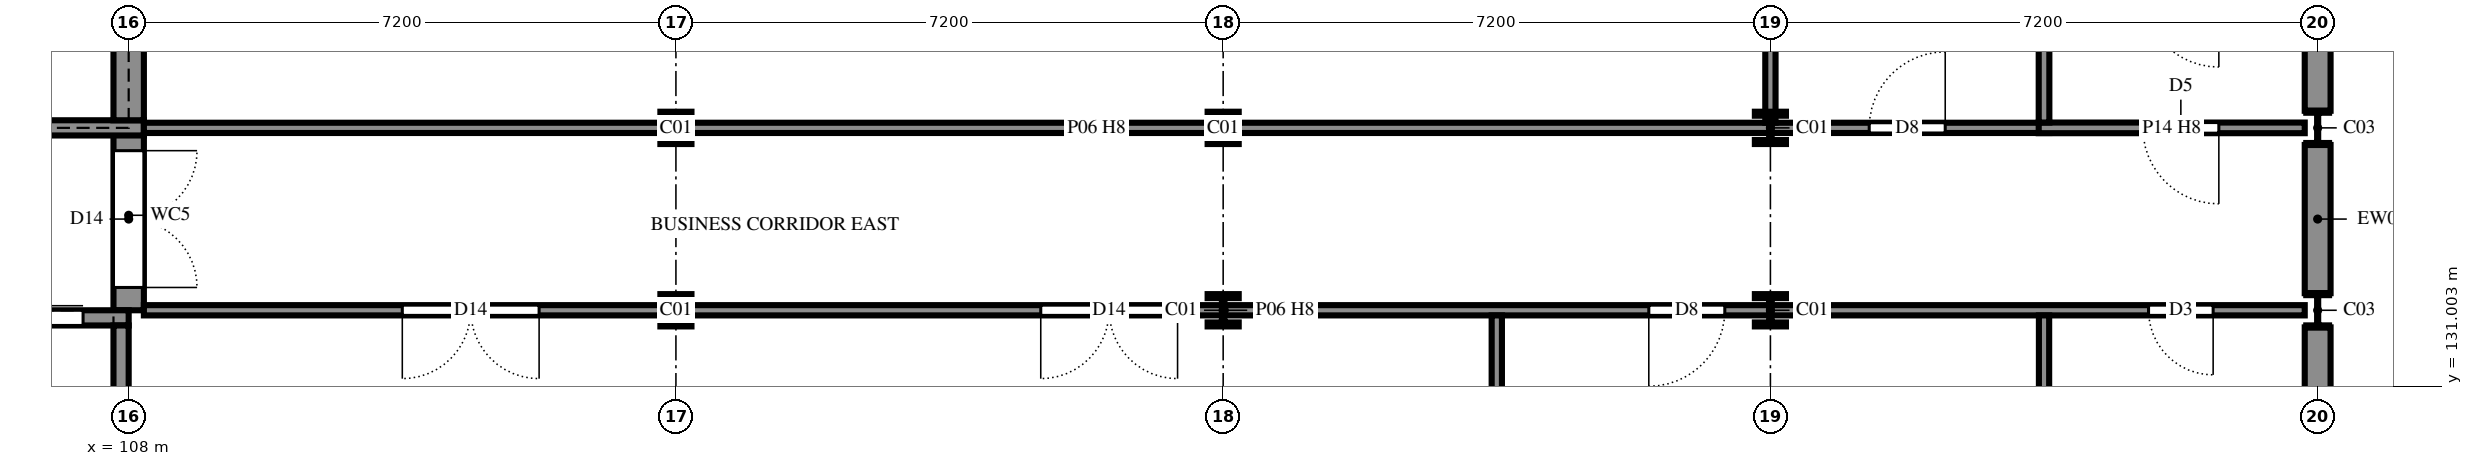
"""IFC4 building model, lengths in metres.
Left out: names, types, materials, properties, quantities, classifications, styles, units other than length and angle.
Written with IfcOpenShell. Run it as: python <this file> out.ifc"""

import sys

from ifc_helpers import new_model, si_unit, direction, frame, frame_2d, origin, origin_2d, place, context, subcontext, project, spatial, rectangle, i_section, extrude, element, fill, save


model = new_model("IFC4")
c1 = context("Model", 3, precision=1e-05, world=origin(), true_north=direction((0.0, 1.0)))
c2 = subcontext(c1, "Body", "Model", "MODEL_VIEW")
j1 = project(units=[si_unit("LENGTHUNIT", "METRE"), si_unit("PLANEANGLEUNIT", "RADIAN")], contexts=[c1])
p1 = place(None, origin())
s1 = spatial("IfcSite", under=j1, at=p1, CompositionType="ELEMENT")
p2 = place(p1, origin())
s2 = spatial("IfcBuilding", under=s1, at=p2, CompositionType="ELEMENT")
p3 = place(p2, frame((0.0, 0.0, 21.6)))
s3 = spatial("IfcBuildingStorey", under=s2, at=p3, CompositionType="ELEMENT", Elevation=21.6)
for number, where, z_axis, x_axis in (
    (1, (115.2, 132.0, 0.0), (0.0, 0.0, 1.0), (1.0, 0.0, 0.0)),
    (2, (115.2, 134.4, 0.0), (0.0, 0.0, 1.0), (1.0, 0.0, 0.0)),
    (3, (122.4, 132.0, 0.0), (0.0, 0.0, 1.0), (1.0, 0.0, 0.0)),
    (4, (122.4, 134.4, 0.0), (0.0, 0.0, 1.0), (1.0, 0.0, 0.0)),
    (5, (129.6, 132.0, 0.0), (0.0, 0.0, 1.0), (1.0, 0.0, 0.0)),
    (6, (129.6, 134.4, 0.0), (0.0, 0.0, 1.0), (1.0, 0.0, 0.0)),
):
    element("IfcColumn", number, at=place(p3, frame(where, z_axis=z_axis, x_axis=x_axis)), inside=s3, PredefinedType="COLUMN", context=c2, shape_type="SweptSolid", body=[
        extrude(i_section(OverallWidth=0.409, OverallDepth=0.425, WebThickness=0.033, FlangeThickness=0.052, FilletRadius=0.015, at=origin_2d()), origin(), (0.0, 0.0, 1.0), 3.6),
    ])
for number, where, z_axis, x_axis in (
    (7, (136.8, 132.0, 0.0), (0.0, 0.0, 1.0), (1.0, 0.0, 0.0)),
    (8, (136.8, 134.4, 0.0), (0.0, 0.0, 1.0), (1.0, 0.0, 0.0)),
):
    element("IfcColumn", number, at=place(p3, frame(where, z_axis=z_axis, x_axis=x_axis)), inside=s3, PredefinedType="COLUMN", context=c2, shape_type="SweptSolid", body=[
        extrude(i_section(OverallWidth=0.3, OverallDepth=0.45, WebThickness=0.014, FlangeThickness=0.026, FilletRadius=0.027, at=origin_2d()), origin(), (0.0, 0.0, 1.0), 3.6),
    ])
p4 = place(p3, frame((108.0, 132.0, 0.0), z_axis=(0.0, 0.0, 1.0), x_axis=(0.0, 1.0, 0.0)))
e9 = element("IfcWall", 9, at=p4, inside=s3, PredefinedType="SHEAR", context=c2, shape_type="SweptSolid", body=[
    extrude(rectangle(XDim=2.5, YDim=0.4, at=frame_2d((1.25, 0.0))), origin(), (0.0, 0.0, 1.0), 3.6),
])
p5 = place(p4, frame((0.3, 0.0, 0.0)))
e10 = element("IfcOpeningElement", 10, at=p5, cuts=e9, PredefinedType="OPENING", context=c2, shape_type="SweptSolid", body=[
    extrude(rectangle(XDim=1.8, YDim=2.1, at=frame_2d((0.9, 1.05))), frame((0.0, 0.21, 0.0), z_axis=(0.0, -1.0, 0.0), x_axis=(1.0, 0.0, 0.0)), (0.0, 0.0, 1.0), 0.42),
])
p6 = place(p3, frame((104.1, 134.4, 0.0), z_axis=(0.0, 0.0, 1.0), x_axis=(1.0, 0.0, 0.0)))
e11 = element("IfcWall", 11, at=p6, inside=s3, PredefinedType="SHEAR", context=c2, shape_type="SweptSolid", body=[
    extrude(rectangle(XDim=4.1, YDim=0.2, at=frame_2d((2.05, 0.0))), origin(), (0.0, 0.0, 1.0), 3.6),
])
p7 = place(p6, frame((1.475, 0.0, 0.0)))
e12 = element("IfcOpeningElement", 12, at=p7, cuts=e11, PredefinedType="OPENING", context=c2, shape_type="SweptSolid", body=[
    extrude(rectangle(XDim=0.85, YDim=2.1, at=frame_2d((0.425, 1.05))), frame((0.0, 0.11, 0.0), z_axis=(0.0, -1.0, 0.0), x_axis=(1.0, 0.0, 0.0)), (0.0, 0.0, 1.0), 0.22),
])
p8 = place(p3, frame((108.0, 134.5, 0.0), z_axis=(0.0, 0.0, 1.0), x_axis=(0.0, 1.0, 0.0)))
e13 = element("IfcWall", 13, at=p8, inside=s3, PredefinedType="SHEAR", context=c2, shape_type="SweptSolid", body=[
    extrude(rectangle(XDim=2.9, YDim=0.4, at=frame_2d((1.45, 0.0))), origin(), (0.0, 0.0, 1.0), 3.6),
])
p9 = place(p3, frame((136.8, 122.625, 0.0), z_axis=(0.0, 0.0, 1.0), x_axis=(0.0, 1.0, 0.0)))
e14 = element("IfcWall", 14, at=p9, inside=s3, PredefinedType="SOLIDWALL", context=c2, shape_type="SweptSolid", body=[
    extrude(rectangle(XDim=9.15, YDim=0.34, at=frame_2d((4.575, 0.0))), origin(), (0.0, 0.0, 1.0), 3.06),
])
p10 = place(p3, frame((136.8, 132.225, 0.0), z_axis=(0.0, 0.0, 1.0), x_axis=(0.0, 1.0, 0.0)))
e15 = element("IfcWall", 15, at=p10, inside=s3, PredefinedType="SOLIDWALL", context=c2, shape_type="SweptSolid", body=[
    extrude(rectangle(XDim=1.95, YDim=0.34, at=frame_2d((0.975, 0.0))), origin(), (0.0, 0.0, 1.0), 3.26),
])
p11 = place(p3, frame((136.8, 134.625, 0.0), z_axis=(0.0, 0.0, 1.0), x_axis=(0.0, 1.0, 0.0)))
e16 = element("IfcWall", 16, at=p11, inside=s3, PredefinedType="SOLIDWALL", context=c2, shape_type="SweptSolid", body=[
    extrude(rectangle(XDim=1.95, YDim=0.34, at=frame_2d((0.975, 0.0))), origin(), (0.0, 0.0, 1.0), 3.46),
])
p12 = place(p3, frame((105.6, 131.9, 0.0), z_axis=(0.0, 0.0, 1.0), x_axis=(1.0, 0.0, 0.0)))
e17 = element("IfcWall", 17, at=p12, inside=s3, PredefinedType="SHEAR", context=c2, shape_type="SweptSolid", body=[
    extrude(rectangle(XDim=2.4, YDim=0.2, at=frame_2d((1.2, 0.0))), origin(), (0.0, 0.0, 1.0), 3.6),
])
p13 = place(p12, frame((0.6, 0.0, 0.0)))
e18 = element("IfcOpeningElement", 18, at=p13, cuts=e17, PredefinedType="OPENING", context=c2, shape_type="SweptSolid", body=[
    extrude(rectangle(XDim=1.2, YDim=2.1, at=frame_2d((0.6, 1.05))), frame((0.0, 0.11, 0.0), z_axis=(0.0, -1.0, 0.0), x_axis=(1.0, 0.0, 0.0)), (0.0, 0.0, 1.0), 0.22),
])
p14 = place(p3, frame((107.9, 129.3, 0.0), z_axis=(0.0, 0.0, 1.0), x_axis=(0.0, 1.0, 0.0)))
e19 = element("IfcWall", 19, at=p14, inside=s3, PredefinedType="SHEAR", context=c2, shape_type="SweptSolid", body=[
    extrude(rectangle(XDim=2.5, YDim=0.2, at=frame_2d((1.25, 0.0))), origin(), (0.0, 0.0, 1.0), 3.6),
])
p15 = place(p3, frame((108.2, 132.0, 0.0), z_axis=(0.0, 0.0, 1.0), x_axis=(1.0, 0.0, 0.0)))
e20 = element("IfcWall", 20, at=p15, inside=s3, PredefinedType="PARTITIONING", context=c2, shape_type="SweptSolid", body=[
    extrude(rectangle(XDim=28.43, YDim=0.135, at=frame_2d((14.215, 0.0))), origin(), (0.0, 0.0, 1.0), 3.16),
])
p16 = place(p15, frame((26.375, 0.0, 0.0)))
e21 = element("IfcOpeningElement", 21, at=p16, cuts=e20, PredefinedType="OPENING", context=c2, shape_type="SweptSolid", body=[
    extrude(rectangle(XDim=0.85, YDim=2.1, at=frame_2d((0.425, 1.05))), frame((0.0, 0.077, 0.0), z_axis=(0.0, -1.0, 0.0), x_axis=(1.0, 0.0, 0.0)), (0.0, 0.0, 1.0), 0.155),
])
p17 = place(p15, frame((3.4, 0.0, 0.0)))
e22 = element("IfcOpeningElement", 22, at=p17, cuts=e20, PredefinedType="OPENING", context=c2, shape_type="SweptSolid", body=[
    extrude(rectangle(XDim=1.8, YDim=2.1, at=frame_2d((0.9, 1.05))), frame((0.0, 0.077, 0.0), z_axis=(0.0, -1.0, 0.0), x_axis=(1.0, 0.0, 0.0)), (0.0, 0.0, 1.0), 0.155),
])
p18 = place(p15, frame((11.8, 0.0, 0.0)))
e23 = element("IfcOpeningElement", 23, at=p18, cuts=e20, PredefinedType="OPENING", context=c2, shape_type="SweptSolid", body=[
    extrude(rectangle(XDim=1.8, YDim=2.1, at=frame_2d((0.9, 1.05))), frame((0.0, 0.077, 0.0), z_axis=(0.0, -1.0, 0.0), x_axis=(1.0, 0.0, 0.0)), (0.0, 0.0, 1.0), 0.155),
])
p19 = place(p15, frame((19.8, 0.0, 0.0)))
e24 = element("IfcOpeningElement", 24, at=p19, cuts=e20, PredefinedType="OPENING", context=c2, shape_type="SweptSolid", body=[
    extrude(rectangle(XDim=1.0, YDim=2.4, at=frame_2d((0.5, 1.2))), frame((0.0, 0.077, 0.0), z_axis=(0.0, -1.0, 0.0), x_axis=(1.0, 0.0, 0.0)), (0.0, 0.0, 1.0), 0.155),
])
p20 = place(p3, frame((108.2, 134.4, 0.0), z_axis=(0.0, 0.0, 1.0), x_axis=(1.0, 0.0, 0.0)))
e25 = element("IfcWall", 25, at=p20, inside=s3, PredefinedType="PARTITIONING", context=c2, shape_type="SweptSolid", body=[
    extrude(rectangle(XDim=25.07, YDim=0.135, at=frame_2d((12.535, 0.0))), origin(), (0.0, 0.0, 1.0), 3.16),
])
p21 = place(p20, frame((22.7, 0.0, 0.0)))
e26 = element("IfcOpeningElement", 26, at=p21, cuts=e25, PredefinedType="OPENING", context=c2, shape_type="SweptSolid", body=[
    extrude(rectangle(XDim=1.0, YDim=2.4, at=frame_2d((0.5, 1.2))), frame((0.0, 0.077, 0.0), z_axis=(0.0, -1.0, 0.0), x_axis=(1.0, 0.0, 0.0)), (0.0, 0.0, 1.0), 0.155),
])
p22 = place(p3, frame((133.13, 134.4, 0.0), z_axis=(0.0, 0.0, 1.0), x_axis=(1.0, 0.0, 0.0)))
e27 = element("IfcWall", 27, at=p22, inside=s3, PredefinedType="PARTITIONING", context=c2, shape_type="SweptSolid", body=[
    extrude(rectangle(XDim=3.5, YDim=0.14, at=frame_2d((1.75, 0.0))), origin(), (0.0, 0.0, 1.0), 3.16),
])
p23 = place(p22, frame((1.37, 0.0, 0.0)))
e28 = element("IfcOpeningElement", 28, at=p23, cuts=e27, PredefinedType="OPENING", context=c2, shape_type="SweptSolid", body=[
    extrude(rectangle(XDim=1.0, YDim=2.1, at=frame_2d((0.5, 1.05))), frame((0.0, 0.08, 0.0), z_axis=(0.0, -1.0, 0.0), x_axis=(1.0, 0.0, 0.0)), (0.0, 0.0, 1.0), 0.16),
])
p24 = place(p3, frame((126.0, 120.8, 0.0), z_axis=(0.0, 0.0, 1.0), x_axis=(0.0, 1.0, 0.0)))
e29 = element("IfcWall", 29, at=p24, inside=s3, PredefinedType="PARTITIONING", context=c2, shape_type="SweptSolid", body=[
    extrude(rectangle(XDim=11.133, YDim=0.135, at=frame_2d((5.566, 0.0))), origin(), (0.0, 0.0, 1.0), 3.06),
])
for number, where, z_axis, x_axis in (
    (30, (129.6, 134.468, 0.0), (0.0, 0.0, 1.0), (0.0, 1.0, 0.0)),
    (31, (133.2, 122.57, 0.0), (0.0, 0.0, 1.0), (0.0, 1.0, 0.0)),
):
    element("IfcWall", number, at=place(p3, frame(where, z_axis=z_axis, x_axis=x_axis)), inside=s3, PredefinedType="PARTITIONING", context=c2, shape_type="SweptSolid", body=[
        extrude(rectangle(XDim=9.363, YDim=0.135, at=frame_2d((4.681, 0.0))), origin(), (0.0, 0.0, 1.0), 3.06),
    ])
p25 = place(p3, frame((133.2, 134.47, 0.0), z_axis=(0.0, 0.0, 1.0), x_axis=(0.0, 1.0, 0.0)))
e32 = element("IfcWall", 32, at=p25, inside=s3, PredefinedType="PARTITIONING", context=c2, shape_type="SweptSolid", body=[
    extrude(rectangle(XDim=3.38, YDim=0.14, at=frame_2d((1.69, 0.0))), origin(), (0.0, 0.0, 1.0), 3.06),
])
p26 = place(p13, origin())
e33 = element("IfcDoor", 33, at=p26, inside=s3, OperationType="SLIDING_TO_LEFT", PredefinedType="DOOR", context=c2, shape_type="SweptSolid", body=[
    extrude(rectangle(XDim=1.2, YDim=2.1, at=frame_2d((0.6, 1.05))), frame((0.0, 0.025, 0.0), z_axis=(0.0, -1.0, 0.0), x_axis=(1.0, 0.0, 0.0)), (0.0, 0.0, 1.0), 0.05),
])
fill(e18, e33)
p27 = place(p16, frame((0.85, 0.0, 0.0), z_axis=(0.0, 0.0, 1.0), x_axis=(-1.0, 0.0, 0.0)))
e34 = element("IfcDoor", 34, at=p27, inside=s3, OperationType="SINGLE_SWING_RIGHT", PredefinedType="DOOR", context=c2, shape_type="SweptSolid", body=[
    extrude(rectangle(XDim=0.85, YDim=2.1, at=frame_2d((0.425, 1.05))), frame((0.0, 0.025, 0.0), z_axis=(0.0, -1.0, 0.0), x_axis=(1.0, 0.0, 0.0)), (0.0, 0.0, 1.0), 0.05),
])
fill(e21, e34)
p28 = place(p17, frame((1.8, 0.0, 0.0), z_axis=(0.0, 0.0, 1.0), x_axis=(-1.0, 0.0, 0.0)))
e35 = element("IfcDoor", 35, at=p28, inside=s3, OperationType="DOUBLE_DOOR_SINGLE_SWING", PredefinedType="DOOR", context=c2, shape_type="SweptSolid", body=[
    extrude(rectangle(XDim=1.8, YDim=2.1, at=frame_2d((0.9, 1.05))), frame((0.0, 0.025, 0.0), z_axis=(0.0, -1.0, 0.0), x_axis=(1.0, 0.0, 0.0)), (0.0, 0.0, 1.0), 0.05),
])
fill(e22, e35)
p29 = place(p18, frame((1.8, 0.0, 0.0), z_axis=(0.0, 0.0, 1.0), x_axis=(-1.0, 0.0, 0.0)))
e36 = element("IfcDoor", 36, at=p29, inside=s3, OperationType="DOUBLE_DOOR_SINGLE_SWING", PredefinedType="DOOR", context=c2, shape_type="SweptSolid", body=[
    extrude(rectangle(XDim=1.8, YDim=2.1, at=frame_2d((0.9, 1.05))), frame((0.0, 0.025, 0.0), z_axis=(0.0, -1.0, 0.0), x_axis=(1.0, 0.0, 0.0)), (0.0, 0.0, 1.0), 0.05),
])
fill(e23, e36)
p30 = place(p19, frame((1.0, 0.0, 0.0), z_axis=(0.0, 0.0, 1.0), x_axis=(-1.0, 0.0, 0.0)))
e37 = element("IfcDoor", 37, at=p30, inside=s3, OperationType="SINGLE_SWING_LEFT", PredefinedType="DOOR", context=c2, shape_type="SweptSolid", body=[
    extrude(rectangle(XDim=1.0, YDim=2.4, at=frame_2d((0.5, 1.2))), frame((0.0, 0.025, 0.0), z_axis=(0.0, -1.0, 0.0), x_axis=(1.0, 0.0, 0.0)), (0.0, 0.0, 1.0), 0.05),
])
fill(e24, e37)
p31 = place(p21, origin())
e38 = element("IfcDoor", 38, at=p31, inside=s3, OperationType="SINGLE_SWING_LEFT", PredefinedType="DOOR", context=c2, shape_type="SweptSolid", body=[
    extrude(rectangle(XDim=1.0, YDim=2.4, at=frame_2d((0.5, 1.2))), frame((0.0, 0.025, 0.0), z_axis=(0.0, -1.0, 0.0), x_axis=(1.0, 0.0, 0.0)), (0.0, 0.0, 1.0), 0.05),
])
fill(e26, e38)
p32 = place(p23, frame((1.0, 0.0, 0.0), z_axis=(0.0, 0.0, 1.0), x_axis=(-1.0, 0.0, 0.0)))
e39 = element("IfcDoor", 39, at=p32, inside=s3, OperationType="SINGLE_SWING_RIGHT", PredefinedType="DOOR", context=c2, shape_type="SweptSolid", body=[
    extrude(rectangle(XDim=1.0, YDim=2.1, at=frame_2d((0.5, 1.05))), frame((0.0, 0.025, 0.0), z_axis=(0.0, -1.0, 0.0), x_axis=(1.0, 0.0, 0.0)), (0.0, 0.0, 1.0), 0.05),
])
fill(e28, e39)
p33 = place(p5, frame((1.8, 0.0, 0.0), z_axis=(0.0, 0.0, 1.0), x_axis=(-1.0, 0.0, 0.0)))
e40 = element("IfcDoor", 40, at=p33, inside=s3, OperationType="DOUBLE_DOOR_SINGLE_SWING", PredefinedType="DOOR", context=c2, shape_type="SweptSolid", body=[
    extrude(rectangle(XDim=1.8, YDim=2.1, at=frame_2d((0.9, 1.05))), frame((0.0, 0.025, 0.0), z_axis=(0.0, -1.0, 0.0), x_axis=(1.0, 0.0, 0.0)), (0.0, 0.0, 1.0), 0.05),
])
fill(e10, e40)
save(model, sys.argv[1])
